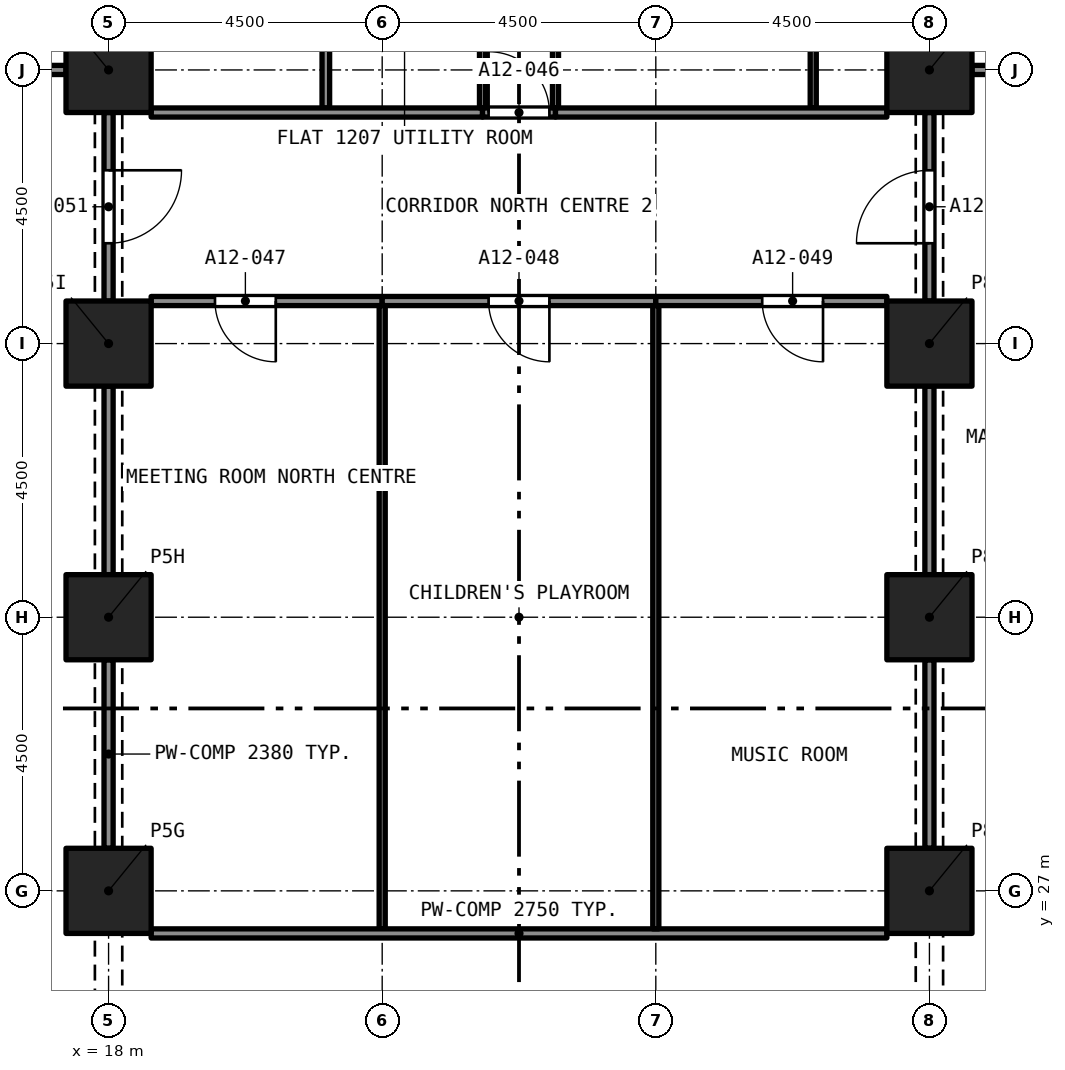
"""IFC4 building model, lengths in metres.
Left out: names, types, materials, properties, quantities, classifications, styles, units other than length and angle.
Written with IfcOpenShell. Run it as: python <this file> out.ifc"""

import sys

from ifc_helpers import new_model, si_unit, direction, frame, frame_2d, origin, origin_2d, place, context, subcontext, project, spatial, rectangle, extrude, element, fill, save


model = new_model("IFC4")
c1 = context("Model", 3, precision=1e-05, world=origin(), true_north=direction((0.0, 1.0)))
c2 = subcontext(c1, "Body", "Model", "MODEL_VIEW")
j1 = project(units=[si_unit("LENGTHUNIT", "METRE"), si_unit("PLANEANGLEUNIT", "RADIAN")], contexts=[c1])
p1 = place(None, origin())
s1 = spatial("IfcSite", under=j1, at=p1, CompositionType="ELEMENT")
p2 = place(p1, origin())
s2 = spatial("IfcBuilding", under=s1, at=p2, CompositionType="ELEMENT")
p3 = place(p2, frame((0.0, 0.0, 49.6)))
s3 = spatial("IfcBuildingStorey", under=s2, at=p3, CompositionType="ELEMENT", Elevation=49.6)
for number, where, z_axis, x_axis in (
    (1, (18.0, 27.0, 0.0), (0.0, 0.0, 1.0), (1.0, 0.0, 0.0)),
    (2, (31.5, 27.0, 0.0), (0.0, 0.0, 1.0), (1.0, 0.0, 0.0)),
    (3, (18.0, 31.5, 0.0), (0.0, 0.0, 1.0), (1.0, 0.0, 0.0)),
    (4, (31.5, 31.5, 0.0), (0.0, 0.0, 1.0), (1.0, 0.0, 0.0)),
    (5, (18.0, 36.0, 0.0), (0.0, 0.0, 1.0), (1.0, 0.0, 0.0)),
    (6, (31.5, 36.0, 0.0), (0.0, 0.0, 1.0), (1.0, 0.0, 0.0)),
    (7, (18.0, 40.5, 0.0), (0.0, 0.0, 1.0), (1.0, 0.0, 0.0)),
    (8, (31.5, 40.5, 0.0), (0.0, 0.0, 1.0), (1.0, 0.0, 0.0)),
):
    element("IfcColumn", number, at=place(p3, frame(where, z_axis=z_axis, x_axis=x_axis)), inside=s3, PredefinedType="COLUMN", context=c2, shape_type="SweptSolid", body=[
        extrude(rectangle(XDim=1.4, YDim=1.4, at=origin_2d()), origin(), (0.0, 0.0, 1.0), 3.2),
    ])
p4 = place(p3, frame((13.5, 40.5, 0.0), z_axis=(0.0, 0.0, 1.0), x_axis=(1.0, 0.0, 0.0)))
e9 = element("IfcWall", 9, at=p4, inside=s3, PredefinedType="PARTITIONING", context=c2, shape_type="SweptSolid", body=[
    extrude(rectangle(XDim=3.8, YDim=0.15, at=frame_2d((1.9, 0.0))), origin(), (0.0, 0.0, 1.0), 2.9),
])
p5 = place(p3, frame((32.2, 40.5, 0.0), z_axis=(0.0, 0.0, 1.0), x_axis=(1.0, 0.0, 0.0)))
e10 = element("IfcWall", 10, at=p5, inside=s3, PredefinedType="PARTITIONING", context=c2, shape_type="SweptSolid", body=[
    extrude(rectangle(XDim=2.15, YDim=0.15, at=frame_2d((1.075, 0.0))), origin(), (0.0, 0.0, 1.0), 2.9),
])
p6 = place(p5, frame((1.02, 0.0, 0.0)))
e11 = element("IfcOpeningElement", 11, at=p6, cuts=e10, PredefinedType="OPENING", context=c2, shape_type="SweptSolid", body=[
    extrude(rectangle(XDim=1.0, YDim=2.1, at=frame_2d((0.5, 1.05))), frame((0.0, 0.085, 0.0), z_axis=(0.0, -1.0, 0.0), x_axis=(1.0, 0.0, 0.0)), (0.0, 0.0, 1.0), 0.17),
])
p7 = place(p3, frame((21.573, 39.875, 0.0), z_axis=(0.0, 0.0, 1.0), x_axis=(0.0, 1.0, 0.0)))
e12 = element("IfcWall", 12, at=p7, inside=s3, PredefinedType="PARTITIONING", context=c2, shape_type="SweptSolid", body=[
    extrude(rectangle(XDim=3.722, YDim=0.125, at=frame_2d((1.861, 0.0))), origin(), (0.0, 0.0, 1.0), 2.75),
])
p8 = place(p3, frame((18.7, 39.8, 0.0), z_axis=(0.0, 0.0, 1.0), x_axis=(1.0, 0.0, 0.0)))
e13 = element("IfcWall", 13, at=p8, inside=s3, PredefinedType="PARTITIONING", context=c2, shape_type="SweptSolid", body=[
    extrude(rectangle(XDim=5.45, YDim=0.15, at=frame_2d((2.725, 0.0))), origin(), (0.0, 0.0, 1.0), 2.75),
])
for number, where, z_axis, x_axis in (
    (14, (25.35, 39.875, 0.0), (0.0, 0.0, 1.0), (0.0, 1.0, 0.0)),
    (15, (24.15, 39.875, 0.0), (0.0, 0.0, 1.0), (0.0, 1.0, 0.0)),
):
    element("IfcWall", number, at=place(p3, frame(where, z_axis=z_axis, x_axis=x_axis)), inside=s3, PredefinedType="PARTITIONING", context=c2, shape_type="SweptSolid", body=[
        extrude(rectangle(XDim=3.735, YDim=0.1, at=frame_2d((1.868, 0.0))), origin(), (0.0, 0.0, 1.0), 2.75),
    ])
p9 = place(p3, frame((24.15, 39.8, 0.0), z_axis=(0.0, 0.0, 1.0), x_axis=(1.0, 0.0, 0.0)))
e16 = element("IfcWall", 16, at=p9, inside=s3, PredefinedType="PARTITIONING", context=c2, shape_type="SweptSolid", body=[
    extrude(rectangle(XDim=1.2, YDim=0.15, at=frame_2d((0.6, 0.0))), origin(), (0.0, 0.0, 1.0), 2.75),
])
p10 = place(p9, frame((0.1, 0.0, 0.0)))
e17 = element("IfcOpeningElement", 17, at=p10, cuts=e16, PredefinedType="OPENING", context=c2, shape_type="SweptSolid", body=[
    extrude(rectangle(XDim=1.0, YDim=2.1, at=frame_2d((0.5, 1.05))), frame((0.0, 0.085, 0.0), z_axis=(0.0, -1.0, 0.0), x_axis=(1.0, 0.0, 0.0)), (0.0, 0.0, 1.0), 0.17),
])
p11 = place(p3, frame((29.589, 39.875, 0.0), z_axis=(0.0, 0.0, 1.0), x_axis=(0.0, 1.0, 0.0)))
e18 = element("IfcWall", 18, at=p11, inside=s3, PredefinedType="PARTITIONING", context=c2, shape_type="SweptSolid", body=[
    extrude(rectangle(XDim=3.735, YDim=0.1, at=frame_2d((1.868, 0.0))), origin(), (0.0, 0.0, 1.0), 2.75),
])
p12 = place(p3, frame((25.35, 39.8, 0.0), z_axis=(0.0, 0.0, 1.0), x_axis=(1.0, 0.0, 0.0)))
e19 = element("IfcWall", 19, at=p12, inside=s3, PredefinedType="PARTITIONING", context=c2, shape_type="SweptSolid", body=[
    extrude(rectangle(XDim=5.45, YDim=0.15, at=frame_2d((2.725, 0.0))), origin(), (0.0, 0.0, 1.0), 2.75),
])
p13 = place(p3, frame((22.5, 36.7, 0.0), z_axis=(0.0, 0.0, 1.0), x_axis=(-1.0, 0.0, 0.0)))
e20 = element("IfcWall", 20, at=p13, inside=s3, PredefinedType="PARTITIONING", context=c2, shape_type="SweptSolid", body=[
    extrude(rectangle(XDim=3.8, YDim=0.15, at=frame_2d((1.9, 0.0))), origin(), (0.0, 0.0, 1.0), 2.75),
])
p14 = place(p13, frame((1.75, 0.0, 0.0)))
e21 = element("IfcOpeningElement", 21, at=p14, cuts=e20, PredefinedType="OPENING", context=c2, shape_type="SweptSolid", body=[
    extrude(rectangle(XDim=1.0, YDim=2.1, at=frame_2d((0.5, 1.05))), frame((0.0, 0.085, 0.0), z_axis=(0.0, -1.0, 0.0), x_axis=(1.0, 0.0, 0.0)), (0.0, 0.0, 1.0), 0.17),
])
p15 = place(p3, frame((27.0, 36.7, 0.0), z_axis=(0.0, 0.0, 1.0), x_axis=(-1.0, 0.0, 0.0)))
e22 = element("IfcWall", 22, at=p15, inside=s3, PredefinedType="PARTITIONING", context=c2, shape_type="SweptSolid", body=[
    extrude(rectangle(XDim=4.5, YDim=0.15, at=frame_2d((2.25, 0.0))), origin(), (0.0, 0.0, 1.0), 2.75),
])
p16 = place(p15, frame((1.75, 0.0, 0.0)))
e23 = element("IfcOpeningElement", 23, at=p16, cuts=e22, PredefinedType="OPENING", context=c2, shape_type="SweptSolid", body=[
    extrude(rectangle(XDim=1.0, YDim=2.1, at=frame_2d((0.5, 1.05))), frame((0.0, 0.085, 0.0), z_axis=(0.0, -1.0, 0.0), x_axis=(1.0, 0.0, 0.0)), (0.0, 0.0, 1.0), 0.17),
])
p17 = place(p3, frame((30.8, 36.7, 0.0), z_axis=(0.0, 0.0, 1.0), x_axis=(-1.0, 0.0, 0.0)))
e24 = element("IfcWall", 24, at=p17, inside=s3, PredefinedType="PARTITIONING", context=c2, shape_type="SweptSolid", body=[
    extrude(rectangle(XDim=3.8, YDim=0.15, at=frame_2d((1.9, 0.0))), origin(), (0.0, 0.0, 1.0), 2.75),
])
p18 = place(p17, frame((1.05, 0.0, 0.0)))
e25 = element("IfcOpeningElement", 25, at=p18, cuts=e24, PredefinedType="OPENING", context=c2, shape_type="SweptSolid", body=[
    extrude(rectangle(XDim=1.0, YDim=2.1, at=frame_2d((0.5, 1.05))), frame((0.0, 0.085, 0.0), z_axis=(0.0, -1.0, 0.0), x_axis=(1.0, 0.0, 0.0)), (0.0, 0.0, 1.0), 0.17),
])
p19 = place(p3, frame((31.5, 36.7, 0.0), z_axis=(0.0, 0.0, 1.0), x_axis=(0.0, 1.0, 0.0)))
e26 = element("IfcWall", 26, at=p19, inside=s3, PredefinedType="PARTITIONING", context=c2, shape_type="SweptSolid", body=[
    extrude(rectangle(XDim=3.1, YDim=0.15, at=frame_2d((1.55, 0.0))), origin(), (0.0, 0.0, 1.0), 2.38),
])
p20 = place(p19, frame((0.95, 0.0, 0.0)))
e27 = element("IfcOpeningElement", 27, at=p20, cuts=e26, PredefinedType="OPENING", context=c2, shape_type="SweptSolid", body=[
    extrude(rectangle(XDim=1.2, YDim=2.1, at=frame_2d((0.6, 1.05))), frame((0.0, 0.085, 0.0), z_axis=(0.0, -1.0, 0.0), x_axis=(1.0, 0.0, 0.0)), (0.0, 0.0, 1.0), 0.17),
])
p21 = place(p3, frame((18.0, 39.8, 0.0), z_axis=(0.0, 0.0, 1.0), x_axis=(0.0, -1.0, 0.0)))
e28 = element("IfcWall", 28, at=p21, inside=s3, PredefinedType="PARTITIONING", context=c2, shape_type="SweptSolid", body=[
    extrude(rectangle(XDim=3.1, YDim=0.15, at=frame_2d((1.55, 0.0))), origin(), (0.0, 0.0, 1.0), 2.38),
])
p22 = place(p21, frame((0.95, 0.0, 0.0)))
e29 = element("IfcOpeningElement", 29, at=p22, cuts=e28, PredefinedType="OPENING", context=c2, shape_type="SweptSolid", body=[
    extrude(rectangle(XDim=1.2, YDim=2.1, at=frame_2d((0.6, 1.05))), frame((0.0, 0.085, 0.0), z_axis=(0.0, -1.0, 0.0), x_axis=(1.0, 0.0, 0.0)), (0.0, 0.0, 1.0), 0.17),
])
p23 = place(p3, frame((22.5, 26.375, 0.0), z_axis=(0.0, 0.0, 1.0), x_axis=(0.0, 1.0, 0.0)))
e30 = element("IfcWall", 30, at=p23, inside=s3, PredefinedType="PARTITIONING", context=c2, shape_type="SweptSolid", body=[
    extrude(rectangle(XDim=10.25, YDim=0.1, at=frame_2d((5.125, 0.0))), origin(), (0.0, 0.0, 1.0), 2.75),
])
for number, where, z_axis, x_axis in (
    (31, (18.0, 27.7, 0.0), (0.0, 0.0, 1.0), (0.0, 1.0, 0.0)),
    (32, (18.0, 32.2, 0.0), (0.0, 0.0, 1.0), (0.0, 1.0, 0.0)),
):
    element("IfcWall", number, at=place(p3, frame(where, z_axis=z_axis, x_axis=x_axis)), inside=s3, PredefinedType="PARTITIONING", context=c2, shape_type="SweptSolid", body=[
        extrude(rectangle(XDim=3.1, YDim=0.15, at=frame_2d((1.55, 0.0))), origin(), (0.0, 0.0, 1.0), 2.38),
    ])
p24 = place(p3, frame((18.7, 26.3, 0.0), z_axis=(0.0, 0.0, 1.0), x_axis=(1.0, 0.0, 0.0)))
e33 = element("IfcWall", 33, at=p24, inside=s3, PredefinedType="PARTITIONING", context=c2, shape_type="SweptSolid", body=[
    extrude(rectangle(XDim=12.1, YDim=0.15, at=frame_2d((6.05, 0.0))), origin(), (0.0, 0.0, 1.0), 2.75),
])
p25 = place(p3, frame((27.0, 26.375, 0.0), z_axis=(0.0, 0.0, 1.0), x_axis=(0.0, 1.0, 0.0)))
e34 = element("IfcWall", 34, at=p25, inside=s3, PredefinedType="PARTITIONING", context=c2, shape_type="SweptSolid", body=[
    extrude(rectangle(XDim=10.25, YDim=0.1, at=frame_2d((5.125, 0.0))), origin(), (0.0, 0.0, 1.0), 2.75),
])
for number, where, z_axis, x_axis in (
    (35, (31.5, 32.2, 0.0), (0.0, 0.0, 1.0), (0.0, 1.0, 0.0)),
    (36, (31.5, 27.7, 0.0), (0.0, 0.0, 1.0), (0.0, 1.0, 0.0)),
):
    element("IfcWall", number, at=place(p3, frame(where, z_axis=z_axis, x_axis=x_axis)), inside=s3, PredefinedType="PARTITIONING", context=c2, shape_type="SweptSolid", body=[
        extrude(rectangle(XDim=3.1, YDim=0.15, at=frame_2d((1.55, 0.0))), origin(), (0.0, 0.0, 1.0), 2.38),
    ])
p26 = place(p10, origin())
e37 = element("IfcDoor", 37, at=p26, inside=s3, OperationType="SINGLE_SWING_RIGHT", PredefinedType="DOOR", context=c2, shape_type="SweptSolid", body=[
    extrude(rectangle(XDim=1.0, YDim=2.1, at=frame_2d((0.5, 1.05))), frame((0.0, 0.025, 0.0), z_axis=(0.0, -1.0, 0.0), x_axis=(1.0, 0.0, 0.0)), (0.0, 0.0, 1.0), 0.05),
])
fill(e17, e37)
p27 = place(p14, origin())
e38 = element("IfcDoor", 38, at=p27, inside=s3, OperationType="SINGLE_SWING_RIGHT", PredefinedType="DOOR", context=c2, shape_type="SweptSolid", body=[
    extrude(rectangle(XDim=1.0, YDim=2.1, at=frame_2d((0.5, 1.05))), frame((0.0, 0.025, 0.0), z_axis=(0.0, -1.0, 0.0), x_axis=(1.0, 0.0, 0.0)), (0.0, 0.0, 1.0), 0.05),
])
fill(e21, e38)
p28 = place(p16, origin())
e39 = element("IfcDoor", 39, at=p28, inside=s3, OperationType="SINGLE_SWING_RIGHT", PredefinedType="DOOR", context=c2, shape_type="SweptSolid", body=[
    extrude(rectangle(XDim=1.0, YDim=2.1, at=frame_2d((0.5, 1.05))), frame((0.0, 0.025, 0.0), z_axis=(0.0, -1.0, 0.0), x_axis=(1.0, 0.0, 0.0)), (0.0, 0.0, 1.0), 0.05),
])
fill(e23, e39)
p29 = place(p18, origin())
e40 = element("IfcDoor", 40, at=p29, inside=s3, OperationType="SINGLE_SWING_LEFT", PredefinedType="DOOR", context=c2, shape_type="SweptSolid", body=[
    extrude(rectangle(XDim=1.0, YDim=2.1, at=frame_2d((0.5, 1.05))), frame((0.0, 0.025, 0.0), z_axis=(0.0, -1.0, 0.0), x_axis=(1.0, 0.0, 0.0)), (0.0, 0.0, 1.0), 0.05),
])
fill(e25, e40)
p30 = place(p20, origin())
e41 = element("IfcDoor", 41, at=p30, inside=s3, OperationType="SINGLE_SWING_LEFT", PredefinedType="DOOR", context=c2, shape_type="SweptSolid", body=[
    extrude(rectangle(XDim=1.2, YDim=2.1, at=frame_2d((0.6, 1.05))), frame((0.0, 0.025, 0.0), z_axis=(0.0, -1.0, 0.0), x_axis=(1.0, 0.0, 0.0)), (0.0, 0.0, 1.0), 0.05),
])
fill(e27, e41)
p31 = place(p22, origin())
e42 = element("IfcDoor", 42, at=p31, inside=s3, OperationType="SINGLE_SWING_LEFT", PredefinedType="DOOR", context=c2, shape_type="SweptSolid", body=[
    extrude(rectangle(XDim=1.2, YDim=2.1, at=frame_2d((0.6, 1.05))), frame((0.0, 0.025, 0.0), z_axis=(0.0, -1.0, 0.0), x_axis=(1.0, 0.0, 0.0)), (0.0, 0.0, 1.0), 0.05),
])
fill(e29, e42)
save(model, sys.argv[1])
